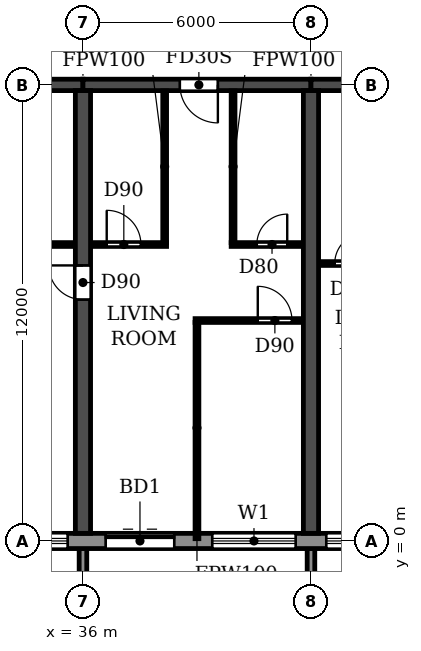
"""IFC4 building model, lengths in metres.
Left out: names, types, materials, properties, quantities, classifications, styles, units other than length and angle.
Written with IfcOpenShell. Run it as: python <this file> out.ifc"""

import sys

from ifc_helpers import new_model, si_unit, direction, frame, frame_2d, origin, place, context, subcontext, project, spatial, polyline, rectangle, outline, extrude, source, transform, mapped, element, fill, save


model = new_model("IFC4")
c1 = context("Model", 3, precision=1e-05, world=origin(), true_north=direction((0.0, 1.0)))
c2 = subcontext(c1, "Body", "Model", "MODEL_VIEW")
j1 = project(units=[si_unit("LENGTHUNIT", "METRE"), si_unit("PLANEANGLEUNIT", "RADIAN")], contexts=[c1])
p1 = place(None, origin())
s1 = spatial("IfcSite", under=j1, at=p1, CompositionType="ELEMENT")
p2 = place(p1, origin())
s2 = spatial("IfcBuilding", under=s1, at=p2, CompositionType="ELEMENT")
p3 = place(p2, frame((0.0, 0.0, 23.4)))
s3 = spatial("IfcBuildingStorey", under=s2, at=p3, CompositionType="ELEMENT", Elevation=23.4)
p4 = place(p3, frame((36.0, 0.2, 0.0), z_axis=(0.0, 0.0, 1.0), x_axis=(0.0, 1.0, 0.0)))
e1 = element("IfcWall", 1, at=p4, inside=s3, PredefinedType="SHEAR", context=c2, shape_type="SweptSolid", body=[
    extrude(rectangle(XDim=11.65, YDim=0.4, at=frame_2d((5.825, 0.0))), origin(), (0.0, 0.0, 1.0), 3.05),
])
p5 = place(p4, frame((6.15, 0.0, 0.0)))
e2 = element("IfcOpeningElement", 2, at=p5, cuts=e1, PredefinedType="OPENING", context=c2, shape_type="SweptSolid", body=[
    extrude(rectangle(XDim=0.9, YDim=2.1, at=frame_2d((0.45, 1.05))), frame((0.0, 0.21, 0.0), z_axis=(0.0, -1.0, 0.0), x_axis=(1.0, 0.0, 0.0)), (0.0, 0.0, 1.0), 0.42),
])
p6 = place(p3, frame((42.0, 0.2, 0.0), z_axis=(0.0, 0.0, 1.0), x_axis=(0.0, 1.0, 0.0)))
e3 = element("IfcWall", 3, at=p6, inside=s3, PredefinedType="SHEAR", context=c2, shape_type="SweptSolid", body=[
    extrude(rectangle(XDim=11.65, YDim=0.4, at=frame_2d((5.825, 0.0))), origin(), (0.0, 0.0, 1.0), 3.05),
])
p7 = place(p3, frame((30.0, 12.0, 0.0), z_axis=(0.0, 0.0, 1.0), x_axis=(1.0, 0.0, 0.0)))
e4 = element("IfcWall", 4, at=p7, inside=s3, PredefinedType="SHEAR", context=c2, shape_type="SweptSolid", body=[
    extrude(rectangle(XDim=6.0, YDim=0.3, at=frame_2d((3.0, 0.0))), origin(), (0.0, 0.0, 1.0), 2.45),
])
p8 = place(p3, frame((36.0, 12.0, 0.0), z_axis=(0.0, 0.0, 1.0), x_axis=(1.0, 0.0, 0.0)))
e5 = element("IfcWall", 5, at=p8, inside=s3, PredefinedType="SHEAR", context=c2, shape_type="SweptSolid", body=[
    extrude(rectangle(XDim=6.0, YDim=0.3, at=frame_2d((3.0, 0.0))), origin(), (0.0, 0.0, 1.0), 2.45),
])
p9 = place(p8, frame((2.55, 0.0, 0.0)))
e6 = element("IfcOpeningElement", 6, at=p9, cuts=e5, PredefinedType="OPENING", context=c2, shape_type="SweptSolid", body=[
    extrude(rectangle(XDim=1.0, YDim=2.1, at=frame_2d((0.5, 1.05))), frame((0.0, 0.16, 0.0), z_axis=(0.0, -1.0, 0.0), x_axis=(1.0, 0.0, 0.0)), (0.0, 0.0, 1.0), 0.32),
])
p10 = place(p3, frame((42.0, 12.0, 0.0), z_axis=(0.0, 0.0, 1.0), x_axis=(1.0, 0.0, 0.0)))
e7 = element("IfcWall", 7, at=p10, inside=s3, PredefinedType="SHEAR", context=c2, shape_type="SweptSolid", body=[
    extrude(rectangle(XDim=6.0, YDim=0.3, at=frame_2d((3.0, 0.0))), origin(), (0.0, 0.0, 1.0), 2.45),
])
p11 = place(p10, frame((2.45, 0.0, 0.0)))
e8 = element("IfcOpeningElement", 8, at=p11, cuts=e7, PredefinedType="OPENING", context=c2, shape_type="SweptSolid", body=[
    extrude(rectangle(XDim=1.0, YDim=2.1, at=frame_2d((0.5, 1.05))), frame((0.0, 0.16, 0.0), z_axis=(0.0, -1.0, 0.0), x_axis=(1.0, 0.0, 0.0)), (0.0, 0.0, 1.0), 0.32),
])
p12 = place(p3, frame((4.683, 0.0, 0.0), z_axis=(0.0, 0.0, 1.0), x_axis=(1.0, 0.0, 0.0)))
e9 = element("IfcWall", 9, at=p12, inside=s3, PredefinedType="STANDARD", context=c2, shape_type="SweptSolid", body=[
    extrude(rectangle(XDim=92.634, YDim=0.4, at=frame_2d((46.317, 0.0))), origin(), (0.0, 0.0, 1.0), 3.05),
])
p13 = place(p12, frame((1.717, 0.0, 0.9)))
e10 = element("IfcOpeningElement", 10, at=p13, cuts=e9, PredefinedType="OPENING", context=c2, shape_type="SweptSolid", body=[
    extrude(rectangle(XDim=2.2, YDim=1.5, at=frame_2d((1.1, 0.75))), frame((0.0, 0.21, 0.0), z_axis=(0.0, -1.0, 0.0), x_axis=(1.0, 0.0, 0.0)), (0.0, 0.0, 1.0), 0.42),
])
p14 = place(p12, frame((4.717, 0.0, 0.9)))
e11 = element("IfcOpeningElement", 11, at=p14, cuts=e9, PredefinedType="OPENING", context=c2, shape_type="SweptSolid", body=[
    extrude(rectangle(XDim=2.2, YDim=1.5, at=frame_2d((1.1, 0.75))), frame((0.0, 0.21, 0.0), z_axis=(0.0, -1.0, 0.0), x_axis=(1.0, 0.0, 0.0)), (0.0, 0.0, 1.0), 0.42),
])
p15 = place(p12, frame((7.717, 0.0, 0.9)))
e12 = element("IfcOpeningElement", 12, at=p15, cuts=e9, PredefinedType="OPENING", context=c2, shape_type="SweptSolid", body=[
    extrude(rectangle(XDim=2.2, YDim=1.5, at=frame_2d((1.1, 0.75))), frame((0.0, 0.21, 0.0), z_axis=(0.0, -1.0, 0.0), x_axis=(1.0, 0.0, 0.0)), (0.0, 0.0, 1.0), 0.42),
])
p16 = place(p12, frame((10.717, 0.0, 0.9)))
e13 = element("IfcOpeningElement", 13, at=p16, cuts=e9, PredefinedType="OPENING", context=c2, shape_type="SweptSolid", body=[
    extrude(rectangle(XDim=2.2, YDim=1.5, at=frame_2d((1.1, 0.75))), frame((0.0, 0.21, 0.0), z_axis=(0.0, -1.0, 0.0), x_axis=(1.0, 0.0, 0.0)), (0.0, 0.0, 1.0), 0.42),
])
p17 = place(p12, frame((13.717, 0.0, 0.9)))
e14 = element("IfcOpeningElement", 14, at=p17, cuts=e9, PredefinedType="OPENING", context=c2, shape_type="SweptSolid", body=[
    extrude(rectangle(XDim=2.2, YDim=1.5, at=frame_2d((1.1, 0.75))), frame((0.0, 0.21, 0.0), z_axis=(0.0, -1.0, 0.0), x_axis=(1.0, 0.0, 0.0)), (0.0, 0.0, 1.0), 0.42),
])
p18 = place(p12, frame((16.717, 0.0, 0.9)))
e15 = element("IfcOpeningElement", 15, at=p18, cuts=e9, PredefinedType="OPENING", context=c2, shape_type="SweptSolid", body=[
    extrude(rectangle(XDim=2.2, YDim=1.5, at=frame_2d((1.1, 0.75))), frame((0.0, 0.21, 0.0), z_axis=(0.0, -1.0, 0.0), x_axis=(1.0, 0.0, 0.0)), (0.0, 0.0, 1.0), 0.42),
])
p19 = place(p12, frame((19.917, 0.0, 0.0)))
e16 = element("IfcOpeningElement", 16, at=p19, cuts=e9, PredefinedType="OPENING", context=c2, shape_type="SweptSolid", body=[
    extrude(rectangle(XDim=1.8, YDim=2.4, at=frame_2d((0.9, 1.2))), frame((0.0, 0.21, 0.0), z_axis=(0.0, -1.0, 0.0), x_axis=(1.0, 0.0, 0.0)), (0.0, 0.0, 1.0), 0.42),
])
p20 = place(p12, frame((22.717, 0.0, 0.9)))
e17 = element("IfcOpeningElement", 17, at=p20, cuts=e9, PredefinedType="OPENING", context=c2, shape_type="SweptSolid", body=[
    extrude(rectangle(XDim=2.2, YDim=1.5, at=frame_2d((1.1, 0.75))), frame((0.0, 0.21, 0.0), z_axis=(0.0, -1.0, 0.0), x_axis=(1.0, 0.0, 0.0)), (0.0, 0.0, 1.0), 0.42),
])
p21 = place(p12, frame((25.717, 0.0, 0.9)))
e18 = element("IfcOpeningElement", 18, at=p21, cuts=e9, PredefinedType="OPENING", context=c2, shape_type="SweptSolid", body=[
    extrude(rectangle(XDim=2.2, YDim=1.5, at=frame_2d((1.1, 0.75))), frame((0.0, 0.21, 0.0), z_axis=(0.0, -1.0, 0.0), x_axis=(1.0, 0.0, 0.0)), (0.0, 0.0, 1.0), 0.42),
])
p22 = place(p12, frame((28.717, 0.0, 0.9)))
e19 = element("IfcOpeningElement", 19, at=p22, cuts=e9, PredefinedType="OPENING", context=c2, shape_type="SweptSolid", body=[
    extrude(rectangle(XDim=2.2, YDim=1.5, at=frame_2d((1.1, 0.75))), frame((0.0, 0.21, 0.0), z_axis=(0.0, -1.0, 0.0), x_axis=(1.0, 0.0, 0.0)), (0.0, 0.0, 1.0), 0.42),
])
p23 = place(p12, frame((31.917, 0.0, 0.0)))
e20 = element("IfcOpeningElement", 20, at=p23, cuts=e9, PredefinedType="OPENING", context=c2, shape_type="SweptSolid", body=[
    extrude(rectangle(XDim=1.8, YDim=2.4, at=frame_2d((0.9, 1.2))), frame((0.0, 0.21, 0.0), z_axis=(0.0, -1.0, 0.0), x_axis=(1.0, 0.0, 0.0)), (0.0, 0.0, 1.0), 0.42),
])
p24 = place(p12, frame((34.717, 0.0, 0.9)))
e21 = element("IfcOpeningElement", 21, at=p24, cuts=e9, PredefinedType="OPENING", context=c2, shape_type="SweptSolid", body=[
    extrude(rectangle(XDim=2.2, YDim=1.5, at=frame_2d((1.1, 0.75))), frame((0.0, 0.21, 0.0), z_axis=(0.0, -1.0, 0.0), x_axis=(1.0, 0.0, 0.0)), (0.0, 0.0, 1.0), 0.42),
])
p25 = place(p12, frame((37.717, 0.0, 0.9)))
e22 = element("IfcOpeningElement", 22, at=p25, cuts=e9, PredefinedType="OPENING", context=c2, shape_type="SweptSolid", body=[
    extrude(rectangle(XDim=2.2, YDim=1.5, at=frame_2d((1.1, 0.75))), frame((0.0, 0.21, 0.0), z_axis=(0.0, -1.0, 0.0), x_axis=(1.0, 0.0, 0.0)), (0.0, 0.0, 1.0), 0.42),
])
p26 = place(p12, frame((40.717, 0.0, 0.9)))
e23 = element("IfcOpeningElement", 23, at=p26, cuts=e9, PredefinedType="OPENING", context=c2, shape_type="SweptSolid", body=[
    extrude(rectangle(XDim=2.2, YDim=1.5, at=frame_2d((1.1, 0.75))), frame((0.0, 0.21, 0.0), z_axis=(0.0, -1.0, 0.0), x_axis=(1.0, 0.0, 0.0)), (0.0, 0.0, 1.0), 0.42),
])
p27 = place(p12, frame((43.917, 0.0, 0.0)))
e24 = element("IfcOpeningElement", 24, at=p27, cuts=e9, PredefinedType="OPENING", context=c2, shape_type="SweptSolid", body=[
    extrude(rectangle(XDim=1.8, YDim=2.4, at=frame_2d((0.9, 1.2))), frame((0.0, 0.21, 0.0), z_axis=(0.0, -1.0, 0.0), x_axis=(1.0, 0.0, 0.0)), (0.0, 0.0, 1.0), 0.42),
])
p28 = place(p12, frame((46.717, 0.0, 0.9)))
e25 = element("IfcOpeningElement", 25, at=p28, cuts=e9, PredefinedType="OPENING", context=c2, shape_type="SweptSolid", body=[
    extrude(rectangle(XDim=2.2, YDim=1.5, at=frame_2d((1.1, 0.75))), frame((0.0, 0.21, 0.0), z_axis=(0.0, -1.0, 0.0), x_axis=(1.0, 0.0, 0.0)), (0.0, 0.0, 1.0), 0.42),
])
p29 = place(p12, frame((49.717, 0.0, 0.9)))
e26 = element("IfcOpeningElement", 26, at=p29, cuts=e9, PredefinedType="OPENING", context=c2, shape_type="SweptSolid", body=[
    extrude(rectangle(XDim=2.2, YDim=1.5, at=frame_2d((1.1, 0.75))), frame((0.0, 0.21, 0.0), z_axis=(0.0, -1.0, 0.0), x_axis=(1.0, 0.0, 0.0)), (0.0, 0.0, 1.0), 0.42),
])
p30 = place(p12, frame((52.717, 0.0, 0.9)))
e27 = element("IfcOpeningElement", 27, at=p30, cuts=e9, PredefinedType="OPENING", context=c2, shape_type="SweptSolid", body=[
    extrude(rectangle(XDim=2.2, YDim=1.5, at=frame_2d((1.1, 0.75))), frame((0.0, 0.21, 0.0), z_axis=(0.0, -1.0, 0.0), x_axis=(1.0, 0.0, 0.0)), (0.0, 0.0, 1.0), 0.42),
])
p31 = place(p12, frame((55.717, 0.0, 0.9)))
e28 = element("IfcOpeningElement", 28, at=p31, cuts=e9, PredefinedType="OPENING", context=c2, shape_type="SweptSolid", body=[
    extrude(rectangle(XDim=2.2, YDim=1.5, at=frame_2d((1.1, 0.75))), frame((0.0, 0.21, 0.0), z_axis=(0.0, -1.0, 0.0), x_axis=(1.0, 0.0, 0.0)), (0.0, 0.0, 1.0), 0.42),
])
p32 = place(p12, frame((58.917, 0.0, 0.0)))
e29 = element("IfcOpeningElement", 29, at=p32, cuts=e9, PredefinedType="OPENING", context=c2, shape_type="SweptSolid", body=[
    extrude(rectangle(XDim=1.8, YDim=2.4, at=frame_2d((0.9, 1.2))), frame((0.0, 0.21, 0.0), z_axis=(0.0, -1.0, 0.0), x_axis=(1.0, 0.0, 0.0)), (0.0, 0.0, 1.0), 0.42),
])
p33 = place(p12, frame((61.717, 0.0, 0.9)))
e30 = element("IfcOpeningElement", 30, at=p33, cuts=e9, PredefinedType="OPENING", context=c2, shape_type="SweptSolid", body=[
    extrude(rectangle(XDim=2.2, YDim=1.5, at=frame_2d((1.1, 0.75))), frame((0.0, 0.21, 0.0), z_axis=(0.0, -1.0, 0.0), x_axis=(1.0, 0.0, 0.0)), (0.0, 0.0, 1.0), 0.42),
])
p34 = place(p12, frame((64.717, 0.0, 0.9)))
e31 = element("IfcOpeningElement", 31, at=p34, cuts=e9, PredefinedType="OPENING", context=c2, shape_type="SweptSolid", body=[
    extrude(rectangle(XDim=2.2, YDim=1.5, at=frame_2d((1.1, 0.75))), frame((0.0, 0.21, 0.0), z_axis=(0.0, -1.0, 0.0), x_axis=(1.0, 0.0, 0.0)), (0.0, 0.0, 1.0), 0.42),
])
p35 = place(p12, frame((67.717, 0.0, 0.9)))
e32 = element("IfcOpeningElement", 32, at=p35, cuts=e9, PredefinedType="OPENING", context=c2, shape_type="SweptSolid", body=[
    extrude(rectangle(XDim=2.2, YDim=1.5, at=frame_2d((1.1, 0.75))), frame((0.0, 0.21, 0.0), z_axis=(0.0, -1.0, 0.0), x_axis=(1.0, 0.0, 0.0)), (0.0, 0.0, 1.0), 0.42),
])
p36 = place(p12, frame((70.917, 0.0, 0.0)))
e33 = element("IfcOpeningElement", 33, at=p36, cuts=e9, PredefinedType="OPENING", context=c2, shape_type="SweptSolid", body=[
    extrude(rectangle(XDim=1.8, YDim=2.4, at=frame_2d((0.9, 1.2))), frame((0.0, 0.21, 0.0), z_axis=(0.0, -1.0, 0.0), x_axis=(1.0, 0.0, 0.0)), (0.0, 0.0, 1.0), 0.42),
])
p37 = place(p12, frame((73.717, 0.0, 0.9)))
e34 = element("IfcOpeningElement", 34, at=p37, cuts=e9, PredefinedType="OPENING", context=c2, shape_type="SweptSolid", body=[
    extrude(rectangle(XDim=2.2, YDim=1.5, at=frame_2d((1.1, 0.75))), frame((0.0, 0.21, 0.0), z_axis=(0.0, -1.0, 0.0), x_axis=(1.0, 0.0, 0.0)), (0.0, 0.0, 1.0), 0.42),
])
p38 = place(p12, frame((76.717, 0.0, 0.9)))
e35 = element("IfcOpeningElement", 35, at=p38, cuts=e9, PredefinedType="OPENING", context=c2, shape_type="SweptSolid", body=[
    extrude(rectangle(XDim=2.2, YDim=1.5, at=frame_2d((1.1, 0.75))), frame((0.0, 0.21, 0.0), z_axis=(0.0, -1.0, 0.0), x_axis=(1.0, 0.0, 0.0)), (0.0, 0.0, 1.0), 0.42),
])
p39 = place(p12, frame((79.717, 0.0, 0.9)))
e36 = element("IfcOpeningElement", 36, at=p39, cuts=e9, PredefinedType="OPENING", context=c2, shape_type="SweptSolid", body=[
    extrude(rectangle(XDim=2.2, YDim=1.5, at=frame_2d((1.1, 0.75))), frame((0.0, 0.21, 0.0), z_axis=(0.0, -1.0, 0.0), x_axis=(1.0, 0.0, 0.0)), (0.0, 0.0, 1.0), 0.42),
])
p40 = place(p12, frame((82.717, 0.0, 0.9)))
e37 = element("IfcOpeningElement", 37, at=p40, cuts=e9, PredefinedType="OPENING", context=c2, shape_type="SweptSolid", body=[
    extrude(rectangle(XDim=2.2, YDim=1.5, at=frame_2d((1.1, 0.75))), frame((0.0, 0.21, 0.0), z_axis=(0.0, -1.0, 0.0), x_axis=(1.0, 0.0, 0.0)), (0.0, 0.0, 1.0), 0.42),
])
p41 = place(p12, frame((85.717, 0.0, 0.9)))
e38 = element("IfcOpeningElement", 38, at=p41, cuts=e9, PredefinedType="OPENING", context=c2, shape_type="SweptSolid", body=[
    extrude(rectangle(XDim=2.2, YDim=1.5, at=frame_2d((1.1, 0.75))), frame((0.0, 0.21, 0.0), z_axis=(0.0, -1.0, 0.0), x_axis=(1.0, 0.0, 0.0)), (0.0, 0.0, 1.0), 0.42),
])
p42 = place(p12, frame((88.717, 0.0, 0.9)))
e39 = element("IfcOpeningElement", 39, at=p42, cuts=e9, PredefinedType="OPENING", context=c2, shape_type="SweptSolid", body=[
    extrude(rectangle(XDim=2.2, YDim=1.5, at=frame_2d((1.1, 0.75))), frame((0.0, 0.21, 0.0), z_axis=(0.0, -1.0, 0.0), x_axis=(1.0, 0.0, 0.0)), (0.0, 0.0, 1.0), 0.42),
])
m1 = source(origin(), c2, "Body", "SweptSolid", [
    extrude(outline(polyline([(0.0, 0.0), (0.2, 0.0), (0.2, 1.65), (0.0, 1.65), (0.0, 0.0)])), origin(), (0.0, 0.0, 1.0), 3.1),
])
for number, where in (
    (40, (35.9, -1.85, 0.0)),
    (41, (41.9, -1.85, 0.0)),
):
    element("IfcWall", number, at=place(p3, frame(where)), inside=s3, PredefinedType="STANDARD", context=c2, shape_type="MappedRepresentation", body=[
        mapped(m1, transform((0.0, 0.0, 0.0))),
    ])
p43 = place(p3, frame((38.95, 5.8, 0.0), z_axis=(0.0, 0.0, 1.0), x_axis=(1.0, 0.0, 0.0)))
e42 = element("IfcWall", 42, at=p43, inside=s3, PredefinedType="PARTITIONING", context=c2, shape_type="SweptSolid", body=[
    extrude(rectangle(XDim=2.84, YDim=0.1, at=frame_2d((1.42, 0.0))), origin(), (0.0, 0.0, 1.0), 3.05),
])
p44 = place(p43, frame((1.65, 0.0, 0.0)))
e43 = element("IfcOpeningElement", 43, at=p44, cuts=e42, PredefinedType="OPENING", context=c2, shape_type="SweptSolid", body=[
    extrude(rectangle(XDim=0.9, YDim=2.1, at=frame_2d((0.45, 1.05))), frame((0.0, 0.06, 0.0), z_axis=(0.0, -1.0, 0.0), x_axis=(1.0, 0.0, 0.0)), (0.0, 0.0, 1.0), 0.12),
])
p45 = place(p3, frame((42.21, 7.3, 0.0), z_axis=(0.0, 0.0, 1.0), x_axis=(1.0, 0.0, 0.0)))
e44 = element("IfcWall", 44, at=p45, inside=s3, PredefinedType="PARTITIONING", context=c2, shape_type="SweptSolid", body=[
    extrude(rectangle(XDim=1.89, YDim=0.1, at=frame_2d((0.945, 0.0))), origin(), (0.0, 0.0, 1.0), 3.05),
])
p46 = place(p45, frame((0.415, 0.0, 0.0)))
e45 = element("IfcOpeningElement", 45, at=p46, cuts=e44, PredefinedType="OPENING", context=c2, shape_type="SweptSolid", body=[
    extrude(rectangle(XDim=0.8, YDim=2.1, at=frame_2d((0.4, 1.05))), frame((0.0, 0.06, 0.0), z_axis=(0.0, -1.0, 0.0), x_axis=(1.0, 0.0, 0.0)), (0.0, 0.0, 1.0), 0.12),
])
p47 = place(p3, frame((33.1, 7.8, 0.0), z_axis=(0.0, 0.0, 1.0), x_axis=(1.0, 0.0, 0.0)))
e46 = element("IfcWall", 46, at=p47, inside=s3, PredefinedType="PARTITIONING", context=c2, shape_type="SweptSolid", body=[
    extrude(rectangle(XDim=2.69, YDim=0.1, at=frame_2d((1.345, 0.0))), origin(), (0.0, 0.0, 1.0), 3.05),
])
p48 = place(p47, frame((1.0, 0.0, 0.0)))
e47 = element("IfcOpeningElement", 47, at=p48, cuts=e46, PredefinedType="OPENING", context=c2, shape_type="SweptSolid", body=[
    extrude(rectangle(XDim=0.8, YDim=2.1, at=frame_2d((0.4, 1.05))), frame((0.0, 0.06, 0.0), z_axis=(0.0, -1.0, 0.0), x_axis=(1.0, 0.0, 0.0)), (0.0, 0.0, 1.0), 0.12),
])
p49 = place(p3, frame((36.21, 7.8, 0.0), z_axis=(0.0, 0.0, 1.0), x_axis=(1.0, 0.0, 0.0)))
e48 = element("IfcWall", 48, at=p49, inside=s3, PredefinedType="PARTITIONING", context=c2, shape_type="SweptSolid", body=[
    extrude(rectangle(XDim=1.99, YDim=0.1, at=frame_2d((0.995, 0.0))), origin(), (0.0, 0.0, 1.0), 3.05),
])
p50 = place(p49, frame((0.415, 0.0, 0.0)))
e49 = element("IfcOpeningElement", 49, at=p50, cuts=e48, PredefinedType="OPENING", context=c2, shape_type="SweptSolid", body=[
    extrude(rectangle(XDim=0.9, YDim=2.1, at=frame_2d((0.45, 1.05))), frame((0.0, 0.06, 0.0), z_axis=(0.0, -1.0, 0.0), x_axis=(1.0, 0.0, 0.0)), (0.0, 0.0, 1.0), 0.12),
])
p51 = place(p3, frame((39.9, 7.8, 0.0), z_axis=(0.0, 0.0, 1.0), x_axis=(1.0, 0.0, 0.0)))
e50 = element("IfcWall", 50, at=p51, inside=s3, PredefinedType="PARTITIONING", context=c2, shape_type="SweptSolid", body=[
    extrude(rectangle(XDim=1.89, YDim=0.1, at=frame_2d((0.945, 0.0))), origin(), (0.0, 0.0, 1.0), 3.05),
])
p52 = place(p51, frame((0.675, 0.0, 0.0)))
e51 = element("IfcOpeningElement", 51, at=p52, cuts=e50, PredefinedType="OPENING", context=c2, shape_type="SweptSolid", body=[
    extrude(rectangle(XDim=0.8, YDim=2.1, at=frame_2d((0.4, 1.05))), frame((0.0, 0.06, 0.0), z_axis=(0.0, -1.0, 0.0), x_axis=(1.0, 0.0, 0.0)), (0.0, 0.0, 1.0), 0.12),
])
p53 = place(p3, frame((38.15, 7.85, 0.0), z_axis=(0.0, 0.0, 1.0), x_axis=(0.0, 1.0, 0.0)))
e52 = element("IfcWall", 52, at=p53, inside=s3, PredefinedType="PARTITIONING", context=c2, shape_type="SweptSolid", body=[
    extrude(rectangle(XDim=3.99, YDim=0.1, at=frame_2d((1.995, 0.0))), origin(), (0.0, 0.0, 1.0), 3.05),
])
p54 = place(p3, frame((39.0, 0.06, 0.0), z_axis=(0.0, 0.0, 1.0), x_axis=(0.0, 1.0, 0.0)))
e53 = element("IfcWall", 53, at=p54, inside=s3, PredefinedType="PARTITIONING", context=c2, shape_type="SweptSolid", body=[
    extrude(rectangle(XDim=5.69, YDim=0.1, at=frame_2d((2.845, 0.0))), origin(), (0.0, 0.0, 1.0), 3.05),
])
p55 = place(p3, frame((39.95, 7.85, 0.0), z_axis=(0.0, 0.0, 1.0), x_axis=(0.0, 1.0, 0.0)))
e54 = element("IfcWall", 54, at=p55, inside=s3, PredefinedType="PARTITIONING", context=c2, shape_type="SweptSolid", body=[
    extrude(rectangle(XDim=3.99, YDim=0.1, at=frame_2d((1.995, 0.0))), origin(), (0.0, 0.0, 1.0), 3.05),
])
p56 = place(p22, origin())
e55 = element("IfcWindow", 55, at=p56, inside=s3, PartitioningType="DOUBLE_PANEL_HORIZONTAL", PredefinedType="WINDOW", context=c2, shape_type="SweptSolid", body=[
    extrude(rectangle(XDim=2.2, YDim=1.5, at=frame_2d((1.1, 0.75))), frame((0.0, 0.03, 0.0), z_axis=(0.0, -1.0, 0.0), x_axis=(1.0, 0.0, 0.0)), (0.0, 0.0, 1.0), 0.06),
])
fill(e19, e55)
p57 = place(p23, origin())
e56 = element("IfcDoor", 56, at=p57, inside=s3, OperationType="DOUBLE_DOOR_SLIDING", PredefinedType="DOOR", context=c2, shape_type="SweptSolid", body=[
    extrude(rectangle(XDim=1.8, YDim=2.4, at=frame_2d((0.9, 1.2))), frame((0.0, 0.025, 0.0), z_axis=(0.0, -1.0, 0.0), x_axis=(1.0, 0.0, 0.0)), (0.0, 0.0, 1.0), 0.05),
])
fill(e20, e56)
p58 = place(p24, origin())
e57 = element("IfcWindow", 57, at=p58, inside=s3, PartitioningType="DOUBLE_PANEL_HORIZONTAL", PredefinedType="WINDOW", context=c2, shape_type="SweptSolid", body=[
    extrude(rectangle(XDim=2.2, YDim=1.5, at=frame_2d((1.1, 0.75))), frame((0.0, 0.03, 0.0), z_axis=(0.0, -1.0, 0.0), x_axis=(1.0, 0.0, 0.0)), (0.0, 0.0, 1.0), 0.06),
])
fill(e21, e57)
p59 = place(p25, origin())
e58 = element("IfcWindow", 58, at=p59, inside=s3, PartitioningType="DOUBLE_PANEL_HORIZONTAL", PredefinedType="WINDOW", context=c2, shape_type="SweptSolid", body=[
    extrude(rectangle(XDim=2.2, YDim=1.5, at=frame_2d((1.1, 0.75))), frame((0.0, 0.03, 0.0), z_axis=(0.0, -1.0, 0.0), x_axis=(1.0, 0.0, 0.0)), (0.0, 0.0, 1.0), 0.06),
])
fill(e22, e58)
p60 = place(p5, origin())
e59 = element("IfcDoor", 59, at=p60, inside=s3, OperationType="SINGLE_SWING_RIGHT", PredefinedType="DOOR", context=c2, shape_type="SweptSolid", body=[
    extrude(rectangle(XDim=0.9, YDim=2.1, at=frame_2d((0.45, 1.05))), frame((0.0, 0.025, 0.0), z_axis=(0.0, -1.0, 0.0), x_axis=(1.0, 0.0, 0.0)), (0.0, 0.0, 1.0), 0.05),
])
fill(e2, e59)
p61 = place(p50, origin())
e60 = element("IfcDoor", 60, at=p61, inside=s3, OperationType="SINGLE_SWING_LEFT", PredefinedType="DOOR", context=c2, shape_type="SweptSolid", body=[
    extrude(rectangle(XDim=0.9, YDim=2.1, at=frame_2d((0.45, 1.05))), frame((0.0, 0.025, 0.0), z_axis=(0.0, -1.0, 0.0), x_axis=(1.0, 0.0, 0.0)), (0.0, 0.0, 1.0), 0.05),
])
fill(e49, e60)
p62 = place(p9, frame((1.0, 0.0, 0.0), z_axis=(0.0, 0.0, 1.0), x_axis=(-1.0, 0.0, 0.0)))
e61 = element("IfcDoor", 61, at=p62, inside=s3, OperationType="SINGLE_SWING_LEFT", PredefinedType="DOOR", context=c2, shape_type="SweptSolid", body=[
    extrude(rectangle(XDim=1.0, YDim=2.1, at=frame_2d((0.5, 1.05))), frame((0.0, 0.025, 0.0), z_axis=(0.0, -1.0, 0.0), x_axis=(1.0, 0.0, 0.0)), (0.0, 0.0, 1.0), 0.05),
])
fill(e6, e61)
p63 = place(p52, origin())
e62 = element("IfcDoor", 62, at=p63, inside=s3, OperationType="SINGLE_SWING_RIGHT", PredefinedType="DOOR", context=c2, shape_type="SweptSolid", body=[
    extrude(rectangle(XDim=0.8, YDim=2.1, at=frame_2d((0.4, 1.05))), frame((0.0, 0.025, 0.0), z_axis=(0.0, -1.0, 0.0), x_axis=(1.0, 0.0, 0.0)), (0.0, 0.0, 1.0), 0.05),
])
fill(e51, e62)
p64 = place(p44, origin())
e63 = element("IfcDoor", 63, at=p64, inside=s3, OperationType="SINGLE_SWING_LEFT", PredefinedType="DOOR", context=c2, shape_type="SweptSolid", body=[
    extrude(rectangle(XDim=0.9, YDim=2.1, at=frame_2d((0.45, 1.05))), frame((0.0, 0.025, 0.0), z_axis=(0.0, -1.0, 0.0), x_axis=(1.0, 0.0, 0.0)), (0.0, 0.0, 1.0), 0.05),
])
fill(e43, e63)
p65 = place(p46, origin())
e64 = element("IfcDoor", 64, at=p65, inside=s3, OperationType="SINGLE_SWING_RIGHT", PredefinedType="DOOR", context=c2, shape_type="SweptSolid", body=[
    extrude(rectangle(XDim=0.8, YDim=2.1, at=frame_2d((0.4, 1.05))), frame((0.0, 0.025, 0.0), z_axis=(0.0, -1.0, 0.0), x_axis=(1.0, 0.0, 0.0)), (0.0, 0.0, 1.0), 0.05),
])
fill(e45, e64)
save(model, sys.argv[1])
